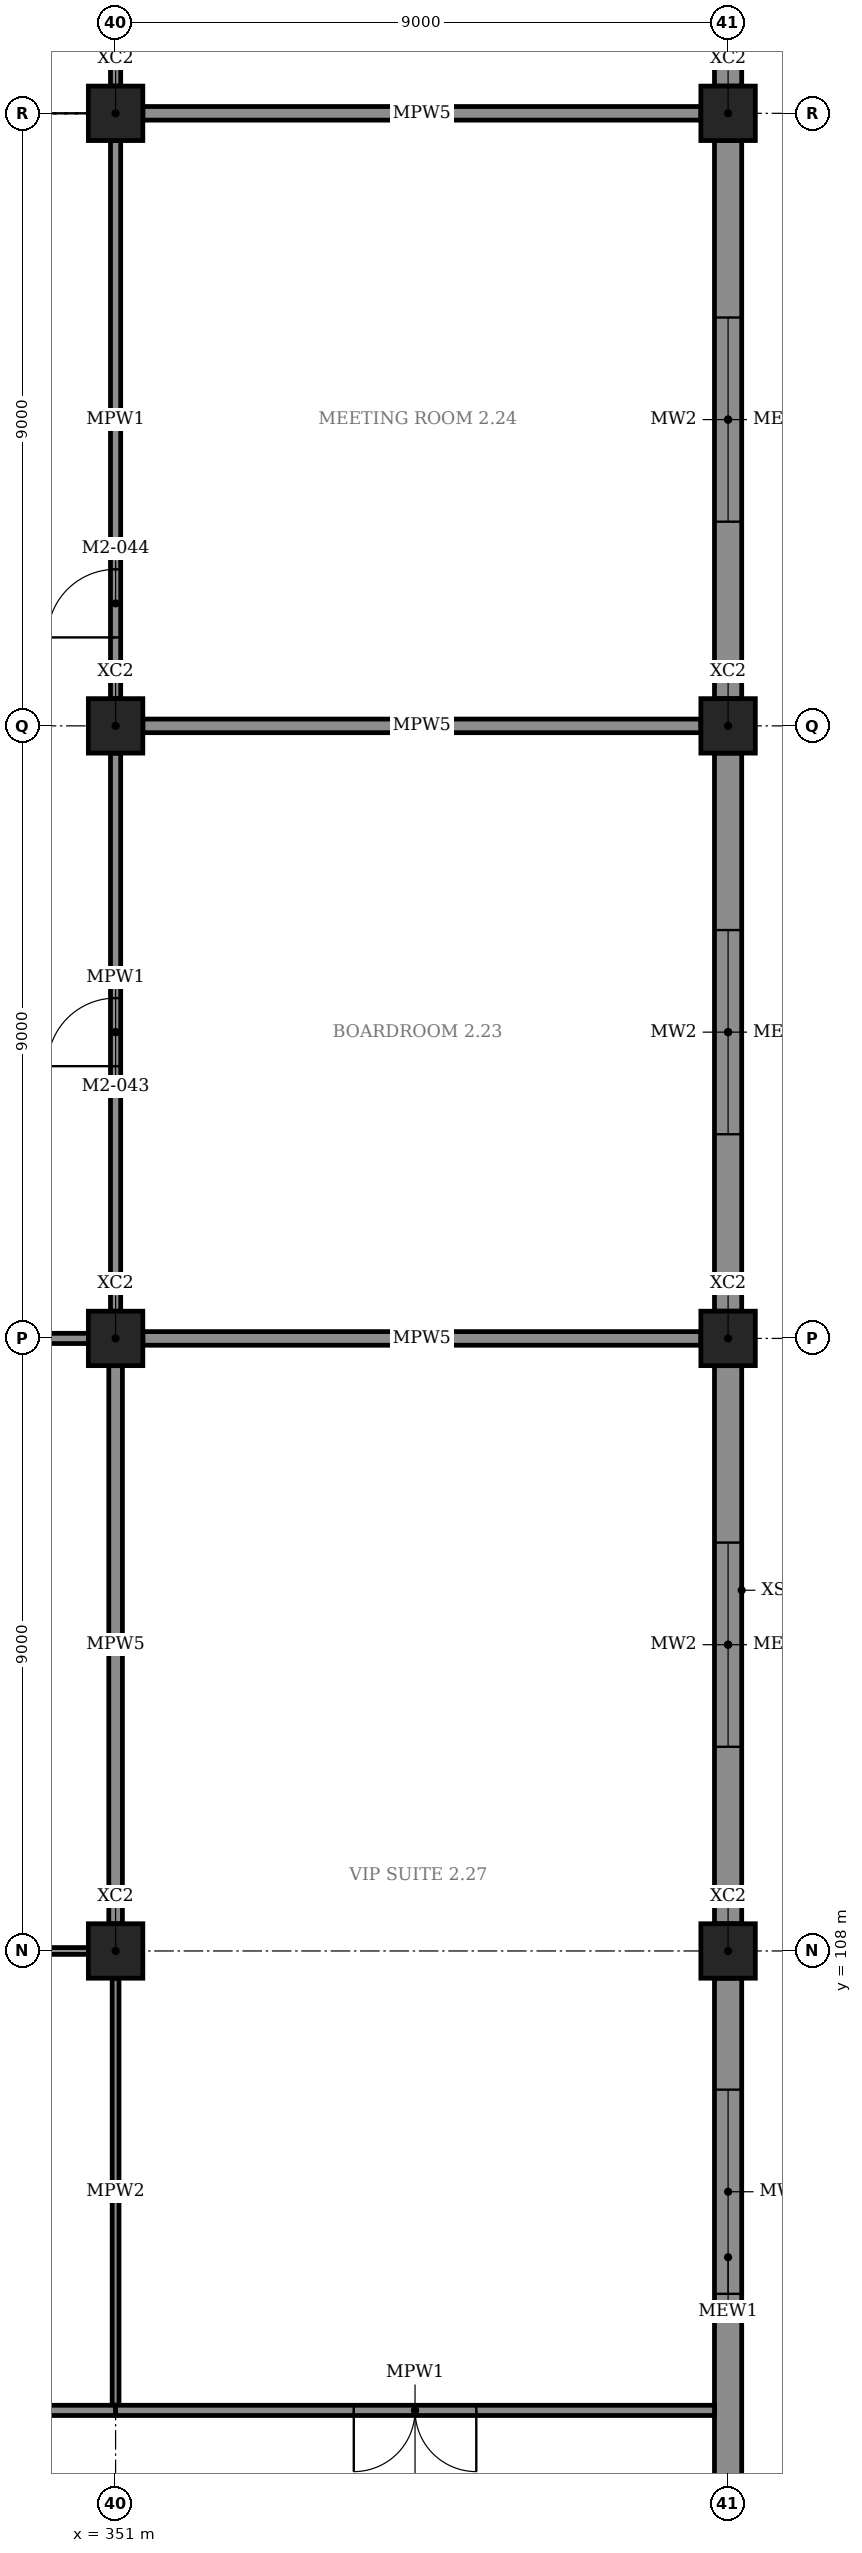
"""IFC4 building model, lengths in metres.
Left out: names, types, materials, properties, quantities, classifications, styles, units other than length and angle.
Written with IfcOpenShell. Run it as: python <this file> out.ifc"""

import sys

from ifc_helpers import new_model, si_unit, direction, frame, frame_2d, origin, origin_2d, place, context, subcontext, project, spatial, rectangle, extrude, element, fill, save


model = new_model("IFC4")
c1 = context("Model", 3, precision=1e-05, world=origin(), true_north=direction((0.0, 1.0)))
c2 = subcontext(c1, "Body", "Model", "MODEL_VIEW")
j1 = project(units=[si_unit("LENGTHUNIT", "METRE"), si_unit("PLANEANGLEUNIT", "RADIAN")], contexts=[c1])
p1 = place(None, origin())
s1 = spatial("IfcSite", under=j1, at=p1, CompositionType="ELEMENT")
p2 = place(p1, origin())
s2 = spatial("IfcBuilding", under=s1, at=p2, CompositionType="ELEMENT")
p3 = place(p2, frame((0.0, 0.0, 11.5)))
s3 = spatial("IfcBuildingStorey", under=s2, at=p3, CompositionType="ELEMENT", Elevation=11.5)
for number, where, z_axis, x_axis in (
    (1, (351.0, 108.0, 0.0), (0.0, 0.0, 1.0), (1.0, 0.0, 0.0)),
    (2, (351.0, 117.0, 0.0), (0.0, 0.0, 1.0), (1.0, 0.0, 0.0)),
    (3, (351.0, 126.0, 0.0), (0.0, 0.0, 1.0), (1.0, 0.0, 0.0)),
    (4, (351.0, 135.0, 0.0), (0.0, 0.0, 1.0), (1.0, 0.0, 0.0)),
    (5, (360.0, 108.0, 0.0), (0.0, 0.0, 1.0), (1.0, 0.0, 0.0)),
    (6, (360.0, 117.0, 0.0), (0.0, 0.0, 1.0), (1.0, 0.0, 0.0)),
    (7, (360.0, 126.0, 0.0), (0.0, 0.0, 1.0), (1.0, 0.0, 0.0)),
    (8, (360.0, 135.0, 0.0), (0.0, 0.0, 1.0), (1.0, 0.0, 0.0)),
):
    element("IfcColumn", number, at=place(p3, frame(where, z_axis=z_axis, x_axis=x_axis)), inside=s3, PredefinedType="COLUMN", context=c2, shape_type="SweptSolid", body=[
        extrude(rectangle(XDim=0.8, YDim=0.8, at=origin_2d()), origin(), (0.0, 0.0, 1.0), 5.5),
    ])
p4 = place(p3, frame((360.0, 99.4, 0.0), z_axis=(0.0, 0.0, 1.0), x_axis=(0.0, 1.0, 0.0)))
e9 = element("IfcWall", 9, at=p4, inside=s3, PredefinedType="STANDARD", context=c2, shape_type="SweptSolid", body=[
    extrude(rectangle(XDim=8.2, YDim=0.4, at=frame_2d((4.1, 0.0))), origin(), (0.0, 0.0, 1.0), 4.32),
])
p5 = place(p4, frame((3.562, 0.0, 0.9)))
e10 = element("IfcOpeningElement", 10, at=p5, cuts=e9, PredefinedType="OPENING", context=c2, shape_type="SweptSolid", body=[
    extrude(rectangle(XDim=3.0, YDim=2.1, at=frame_2d((1.5, 1.05))), frame((0.0, 0.21, 0.0), z_axis=(0.0, -1.0, 0.0), x_axis=(1.0, 0.0, 0.0)), (0.0, 0.0, 1.0), 0.42),
])
p6 = place(p3, frame((360.0, 108.4, 0.0), z_axis=(0.0, 0.0, 1.0), x_axis=(0.0, 1.0, 0.0)))
e11 = element("IfcWall", 11, at=p6, inside=s3, PredefinedType="STANDARD", context=c2, shape_type="SweptSolid", body=[
    extrude(rectangle(XDim=8.2, YDim=0.4, at=frame_2d((4.1, 0.0))), origin(), (0.0, 0.0, 1.0), 4.32),
])
p7 = place(p6, frame((2.6, 0.0, 0.9)))
e12 = element("IfcOpeningElement", 12, at=p7, cuts=e11, PredefinedType="OPENING", context=c2, shape_type="SweptSolid", body=[
    extrude(rectangle(XDim=3.0, YDim=2.1, at=frame_2d((1.5, 1.05))), frame((0.0, 0.21, 0.0), z_axis=(0.0, -1.0, 0.0), x_axis=(1.0, 0.0, 0.0)), (0.0, 0.0, 1.0), 0.42),
])
p8 = place(p3, frame((360.0, 117.4, 0.0), z_axis=(0.0, 0.0, 1.0), x_axis=(0.0, 1.0, 0.0)))
e13 = element("IfcWall", 13, at=p8, inside=s3, PredefinedType="STANDARD", context=c2, shape_type="SweptSolid", body=[
    extrude(rectangle(XDim=8.2, YDim=0.4, at=frame_2d((4.1, 0.0))), origin(), (0.0, 0.0, 1.0), 4.32),
])
p9 = place(p8, frame((2.6, 0.0, 0.9)))
e14 = element("IfcOpeningElement", 14, at=p9, cuts=e13, PredefinedType="OPENING", context=c2, shape_type="SweptSolid", body=[
    extrude(rectangle(XDim=3.0, YDim=2.1, at=frame_2d((1.5, 1.05))), frame((0.0, 0.21, 0.0), z_axis=(0.0, -1.0, 0.0), x_axis=(1.0, 0.0, 0.0)), (0.0, 0.0, 1.0), 0.42),
])
p10 = place(p3, frame((360.0, 126.4, 0.0), z_axis=(0.0, 0.0, 1.0), x_axis=(0.0, 1.0, 0.0)))
e15 = element("IfcWall", 15, at=p10, inside=s3, PredefinedType="STANDARD", context=c2, shape_type="SweptSolid", body=[
    extrude(rectangle(XDim=8.2, YDim=0.4, at=frame_2d((4.1, 0.0))), origin(), (0.0, 0.0, 1.0), 4.32),
])
p11 = place(p10, frame((2.6, 0.0, 0.9)))
e16 = element("IfcOpeningElement", 16, at=p11, cuts=e15, PredefinedType="OPENING", context=c2, shape_type="SweptSolid", body=[
    extrude(rectangle(XDim=3.0, YDim=2.1, at=frame_2d((1.5, 1.05))), frame((0.0, 0.21, 0.0), z_axis=(0.0, -1.0, 0.0), x_axis=(1.0, 0.0, 0.0)), (0.0, 0.0, 1.0), 0.42),
])
p12 = place(p3, frame((360.0, 135.4, 0.0), z_axis=(0.0, 0.0, 1.0), x_axis=(0.0, 1.0, 0.0)))
e17 = element("IfcWall", 17, at=p12, inside=s3, PredefinedType="STANDARD", context=c2, shape_type="SweptSolid", body=[
    extrude(rectangle(XDim=8.2, YDim=0.4, at=frame_2d((4.1, 0.0))), origin(), (0.0, 0.0, 1.0), 4.32),
])
p13 = place(p12, frame((2.6, 0.0, 0.9)))
e18 = element("IfcOpeningElement", 18, at=p13, cuts=e17, PredefinedType="OPENING", context=c2, shape_type="SweptSolid", body=[
    extrude(rectangle(XDim=3.0, YDim=2.1, at=frame_2d((1.5, 1.05))), frame((0.0, 0.21, 0.0), z_axis=(0.0, -1.0, 0.0), x_axis=(1.0, 0.0, 0.0)), (0.0, 0.0, 1.0), 0.42),
])
p14 = place(p3, frame((342.0, 101.25, 0.0), z_axis=(0.0, 0.0, 1.0), x_axis=(1.0, 0.0, 0.0)))
e19 = element("IfcWall", 19, at=p14, inside=s3, PredefinedType="PARTITIONING", context=c2, shape_type="SweptSolid", body=[
    extrude(rectangle(XDim=9.0, YDim=0.15, at=frame_2d((4.5, 0.0))), origin(), (0.0, 0.0, 1.0), 4.32),
])
p15 = place(p14, frame((4.0, 0.0, 0.0)))
e20 = element("IfcOpeningElement", 20, at=p15, cuts=e19, PredefinedType="OPENING", context=c2, shape_type="SweptSolid", body=[
    extrude(rectangle(XDim=1.0, YDim=2.4, at=frame_2d((0.5, 1.2))), frame((0.0, 0.085, 0.0), z_axis=(0.0, -1.0, 0.0), x_axis=(1.0, 0.0, 0.0)), (0.0, 0.0, 1.0), 0.17),
])
p16 = place(p3, frame((342.4, 108.0, 0.0), z_axis=(0.0, 0.0, 1.0), x_axis=(1.0, 0.0, 0.0)))
e21 = element("IfcWall", 21, at=p16, inside=s3, PredefinedType="PARTITIONING", context=c2, shape_type="SweptSolid", body=[
    extrude(rectangle(XDim=8.2, YDim=0.1, at=frame_2d((4.1, 0.0))), origin(), (0.0, 0.0, 1.0), 4.32),
])
p17 = place(p3, frame((351.0, 101.325, 0.0), z_axis=(0.0, 0.0, 1.0), x_axis=(0.0, 1.0, 0.0)))
e22 = element("IfcWall", 22, at=p17, inside=s3, PredefinedType="PARTITIONING", context=c2, shape_type="SweptSolid", body=[
    extrude(rectangle(XDim=6.275, YDim=0.1, at=frame_2d((3.138, 0.0))), origin(), (0.0, 0.0, 1.0), 4.32),
])
p18 = place(p3, frame((342.4, 117.0, 0.0), z_axis=(0.0, 0.0, 1.0), x_axis=(1.0, 0.0, 0.0)))
e23 = element("IfcWall", 23, at=p18, inside=s3, PredefinedType="PARTITIONING", context=c2, shape_type="SweptSolid", body=[
    extrude(rectangle(XDim=8.2, YDim=0.15, at=frame_2d((4.1, 0.0))), origin(), (0.0, 0.0, 1.0), 4.32),
])
p19 = place(p18, frame((3.6, 0.0, 0.0)))
e24 = element("IfcOpeningElement", 24, at=p19, cuts=e23, PredefinedType="OPENING", context=c2, shape_type="SweptSolid", body=[
    extrude(rectangle(XDim=1.0, YDim=2.4, at=frame_2d((0.5, 1.2))), frame((0.0, 0.085, 0.0), z_axis=(0.0, -1.0, 0.0), x_axis=(1.0, 0.0, 0.0)), (0.0, 0.0, 1.0), 0.17),
])
for number, where, z_axis, x_axis in (
    (25, (351.0, 108.4, 0.0), (0.0, 0.0, 1.0), (0.0, 1.0, 0.0)),
    (26, (351.4, 117.0, 0.0), (0.0, 0.0, 1.0), (1.0, 0.0, 0.0)),
    (27, (351.4, 126.0, 0.0), (0.0, 0.0, 1.0), (1.0, 0.0, 0.0)),
):
    element("IfcWall", number, at=place(p3, frame(where, z_axis=z_axis, x_axis=x_axis)), inside=s3, PredefinedType="PARTITIONING", context=c2, shape_type="SweptSolid", body=[
        extrude(rectangle(XDim=8.2, YDim=0.2, at=frame_2d((4.1, 0.0))), origin(), (0.0, 0.0, 1.0), 4.32),
    ])
p20 = place(p3, frame((351.0, 117.4, 0.0), z_axis=(0.0, 0.0, 1.0), x_axis=(0.0, 1.0, 0.0)))
e28 = element("IfcWall", 28, at=p20, inside=s3, PredefinedType="PARTITIONING", context=c2, shape_type="SweptSolid", body=[
    extrude(rectangle(XDim=8.2, YDim=0.15, at=frame_2d((4.1, 0.0))), origin(), (0.0, 0.0, 1.0), 4.32),
])
p21 = place(p20, frame((3.6, 0.0, 0.0)))
e29 = element("IfcOpeningElement", 29, at=p21, cuts=e28, PredefinedType="OPENING", context=c2, shape_type="SweptSolid", body=[
    extrude(rectangle(XDim=1.0, YDim=2.4, at=frame_2d((0.5, 1.2))), frame((0.0, 0.085, 0.0), z_axis=(0.0, -1.0, 0.0), x_axis=(1.0, 0.0, 0.0)), (0.0, 0.0, 1.0), 0.17),
])
p22 = place(p3, frame((351.4, 135.0, 0.0), z_axis=(0.0, 0.0, 1.0), x_axis=(1.0, 0.0, 0.0)))
e30 = element("IfcWall", 30, at=p22, inside=s3, PredefinedType="PARTITIONING", context=c2, shape_type="SweptSolid", body=[
    extrude(rectangle(XDim=8.2, YDim=0.2, at=frame_2d((4.1, 0.0))), origin(), (0.0, 0.0, 1.0), 4.32),
])
p23 = place(p3, frame((351.0, 126.4, 0.0), z_axis=(0.0, 0.0, 1.0), x_axis=(0.0, 1.0, 0.0)))
e31 = element("IfcWall", 31, at=p23, inside=s3, PredefinedType="PARTITIONING", context=c2, shape_type="SweptSolid", body=[
    extrude(rectangle(XDim=8.2, YDim=0.15, at=frame_2d((4.1, 0.0))), origin(), (0.0, 0.0, 1.0), 4.32),
])
p24 = place(p23, frame((0.9, 0.0, 0.0)))
e32 = element("IfcOpeningElement", 32, at=p24, cuts=e31, PredefinedType="OPENING", context=c2, shape_type="SweptSolid", body=[
    extrude(rectangle(XDim=1.0, YDim=2.4, at=frame_2d((0.5, 1.2))), frame((0.0, 0.085, 0.0), z_axis=(0.0, -1.0, 0.0), x_axis=(1.0, 0.0, 0.0)), (0.0, 0.0, 1.0), 0.17),
])
p25 = place(p3, frame((351.0, 135.4, 0.0), z_axis=(0.0, 0.0, 1.0), x_axis=(0.0, 1.0, 0.0)))
e33 = element("IfcWall", 33, at=p25, inside=s3, PredefinedType="PARTITIONING", context=c2, shape_type="SweptSolid", body=[
    extrude(rectangle(XDim=8.2, YDim=0.15, at=frame_2d((4.1, 0.0))), origin(), (0.0, 0.0, 1.0), 4.32),
])
p26 = place(p25, frame((6.3, 0.0, 0.0)))
e34 = element("IfcOpeningElement", 34, at=p26, cuts=e33, PredefinedType="OPENING", context=c2, shape_type="SweptSolid", body=[
    extrude(rectangle(XDim=1.0, YDim=2.4, at=frame_2d((0.5, 1.2))), frame((0.0, 0.085, 0.0), z_axis=(0.0, -1.0, 0.0), x_axis=(1.0, 0.0, 0.0)), (0.0, 0.0, 1.0), 0.17),
])
p27 = place(p3, frame((351.0, 101.25, 0.0), z_axis=(0.0, 0.0, 1.0), x_axis=(1.0, 0.0, 0.0)))
e35 = element("IfcWall", 35, at=p27, inside=s3, PredefinedType="PARTITIONING", context=c2, shape_type="SweptSolid", body=[
    extrude(rectangle(XDim=8.8, YDim=0.15, at=frame_2d((4.4, 0.0))), origin(), (0.0, 0.0, 1.0), 4.32),
])
p28 = place(p27, frame((3.5, 0.0, 0.0)))
e36 = element("IfcOpeningElement", 36, at=p28, cuts=e35, PredefinedType="OPENING", context=c2, shape_type="SweptSolid", body=[
    extrude(rectangle(XDim=1.8, YDim=2.4, at=frame_2d((0.9, 1.2))), frame((0.0, 0.085, 0.0), z_axis=(0.0, -1.0, 0.0), x_axis=(1.0, 0.0, 0.0)), (0.0, 0.0, 1.0), 0.17),
])
p29 = place(p5, origin())
e37 = element("IfcWindow", 37, at=p29, inside=s3, PartitioningType="TRIPLE_PANEL_VERTICAL", PredefinedType="WINDOW", context=c2, shape_type="SweptSolid", body=[
    extrude(rectangle(XDim=3.0, YDim=2.1, at=frame_2d((1.5, 1.05))), frame((0.0, 0.03, 0.0), z_axis=(0.0, -1.0, 0.0), x_axis=(1.0, 0.0, 0.0)), (0.0, 0.0, 1.0), 0.06),
])
fill(e10, e37)
p30 = place(p7, origin())
e38 = element("IfcWindow", 38, at=p30, inside=s3, PartitioningType="TRIPLE_PANEL_VERTICAL", PredefinedType="WINDOW", context=c2, shape_type="SweptSolid", body=[
    extrude(rectangle(XDim=3.0, YDim=2.1, at=frame_2d((1.5, 1.05))), frame((0.0, 0.03, 0.0), z_axis=(0.0, -1.0, 0.0), x_axis=(1.0, 0.0, 0.0)), (0.0, 0.0, 1.0), 0.06),
])
fill(e12, e38)
p31 = place(p9, origin())
e39 = element("IfcWindow", 39, at=p31, inside=s3, PartitioningType="TRIPLE_PANEL_VERTICAL", PredefinedType="WINDOW", context=c2, shape_type="SweptSolid", body=[
    extrude(rectangle(XDim=3.0, YDim=2.1, at=frame_2d((1.5, 1.05))), frame((0.0, 0.03, 0.0), z_axis=(0.0, -1.0, 0.0), x_axis=(1.0, 0.0, 0.0)), (0.0, 0.0, 1.0), 0.06),
])
fill(e14, e39)
p32 = place(p11, origin())
e40 = element("IfcWindow", 40, at=p32, inside=s3, PartitioningType="TRIPLE_PANEL_VERTICAL", PredefinedType="WINDOW", context=c2, shape_type="SweptSolid", body=[
    extrude(rectangle(XDim=3.0, YDim=2.1, at=frame_2d((1.5, 1.05))), frame((0.0, 0.03, 0.0), z_axis=(0.0, -1.0, 0.0), x_axis=(1.0, 0.0, 0.0)), (0.0, 0.0, 1.0), 0.06),
])
fill(e16, e40)
p33 = place(p21, origin())
e41 = element("IfcDoor", 41, at=p33, inside=s3, OperationType="SINGLE_SWING_LEFT", PredefinedType="DOOR", context=c2, shape_type="SweptSolid", body=[
    extrude(rectangle(XDim=1.0, YDim=2.4, at=frame_2d((0.5, 1.2))), frame((0.0, 0.025, 0.0), z_axis=(0.0, -1.0, 0.0), x_axis=(1.0, 0.0, 0.0)), (0.0, 0.0, 1.0), 0.05),
])
fill(e29, e41)
p34 = place(p24, origin())
e42 = element("IfcDoor", 42, at=p34, inside=s3, OperationType="SINGLE_SWING_LEFT", PredefinedType="DOOR", context=c2, shape_type="SweptSolid", body=[
    extrude(rectangle(XDim=1.0, YDim=2.4, at=frame_2d((0.5, 1.2))), frame((0.0, 0.025, 0.0), z_axis=(0.0, -1.0, 0.0), x_axis=(1.0, 0.0, 0.0)), (0.0, 0.0, 1.0), 0.05),
])
fill(e32, e42)
p35 = place(p28, frame((1.8, 0.0, 0.0), z_axis=(0.0, 0.0, 1.0), x_axis=(-1.0, 0.0, 0.0)))
e43 = element("IfcDoor", 43, at=p35, inside=s3, OperationType="DOUBLE_DOOR_SINGLE_SWING", PredefinedType="DOOR", context=c2, shape_type="SweptSolid", body=[
    extrude(rectangle(XDim=1.8, YDim=2.4, at=frame_2d((0.9, 1.2))), frame((0.0, 0.025, 0.0), z_axis=(0.0, -1.0, 0.0), x_axis=(1.0, 0.0, 0.0)), (0.0, 0.0, 1.0), 0.05),
])
fill(e36, e43)
save(model, sys.argv[1])
